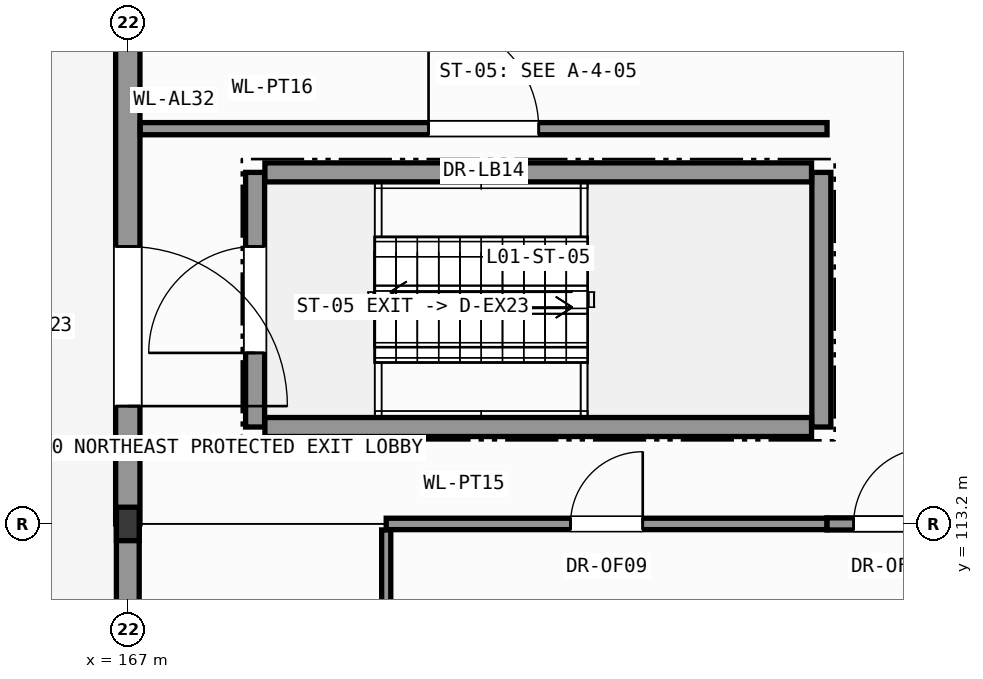
"""IFC4 building model, lengths in metres.
Left out: names, types, materials, properties, quantities, classifications, styles, units other than length and angle.
Written with IfcOpenShell. Run it as: python <this file> out.ifc"""

import sys

from ifc_helpers import new_model, si_unit, direction, frame, frame_2d, origin, origin_2d, place, context, subcontext, project, spatial, rectangle, i_section, extrude, element, fill, save


model = new_model("IFC4")
c1 = context("Model", 3, precision=1e-05, world=origin(), true_north=direction((0.0, 1.0)))
c2 = subcontext(c1, "Body", "Model", "MODEL_VIEW")
j1 = project(units=[si_unit("LENGTHUNIT", "METRE"), si_unit("PLANEANGLEUNIT", "RADIAN")], contexts=[c1])
p1 = place(None, origin())
s1 = spatial("IfcSite", under=j1, at=p1, CompositionType="ELEMENT")
p2 = place(p1, origin())
s2 = spatial("IfcBuilding", under=s1, at=p2, CompositionType="ELEMENT")
p3 = place(p2, origin())
s3 = spatial("IfcBuildingStorey", under=s2, at=p3, CompositionType="ELEMENT", Elevation=0.0)
p4 = place(p3, frame((167.0, 113.2, 0.0), z_axis=(0.0, 0.0, 1.0), x_axis=(1.0, 0.0, 0.0)))
e1 = element("IfcColumn", 1, at=p4, inside=s3, PredefinedType="COLUMN", context=c2, shape_type="SweptSolid", body=[
    extrude(i_section(OverallWidth=0.3, OverallDepth=0.44, WebThickness=0.011, FlangeThickness=0.021, FilletRadius=0.027, at=origin_2d()), origin(), (0.0, 0.0, 1.0), 7.8),
])
p5 = place(p3, frame((167.0, 113.2, 0.0), z_axis=(0.0, 0.0, 1.0), x_axis=(0.0, 1.0, 0.0)))
e2 = element("IfcWall", 2, at=p5, inside=s3, PredefinedType="SOLIDWALL", context=c2, shape_type="SweptSolid", body=[
    extrude(rectangle(XDim=7.6, YDim=0.32, at=frame_2d((3.8, 0.0))), origin(), (0.0, 0.0, 1.0), 7.235),
])
p6 = place(p5, frame((1.55, 0.0, 0.0)))
e3 = element("IfcOpeningElement", 3, at=p6, cuts=e2, PredefinedType="OPENING", context=c2, shape_type="SweptSolid", body=[
    extrude(rectangle(XDim=2.1, YDim=2.65, at=frame_2d((1.05, 1.325))), frame((0.0, 0.17, 0.0), z_axis=(0.0, -1.0, 0.0), x_axis=(1.0, 0.0, 0.0)), (0.0, 0.0, 1.0), 0.34),
])
p7 = place(p3, frame((167.0, 105.6, 0.0), z_axis=(0.0, 0.0, 1.0), x_axis=(0.0, 1.0, 0.0)))
e4 = element("IfcWall", 4, at=p7, inside=s3, PredefinedType="SOLIDWALL", context=c2, shape_type="SweptSolid", body=[
    extrude(rectangle(XDim=7.6, YDim=0.3, at=frame_2d((3.8, 0.0))), origin(), (0.0, 0.0, 1.0), 7.235),
])
p8 = place(p7, frame((1.783, 0.0, 0.95)))
e5 = element("IfcOpeningElement", 5, at=p8, cuts=e4, PredefinedType="OPENING", context=c2, shape_type="SweptSolid", body=[
    extrude(rectangle(XDim=1.5, YDim=2.4, at=frame_2d((0.75, 1.2))), frame((0.0, 0.16, 0.0), z_axis=(0.0, -1.0, 0.0), x_axis=(1.0, 0.0, 0.0)), (0.0, 0.0, 1.0), 0.32),
])
p9 = place(p7, frame((4.317, 0.0, 0.95)))
e6 = element("IfcOpeningElement", 6, at=p9, cuts=e4, PredefinedType="OPENING", context=c2, shape_type="SweptSolid", body=[
    extrude(rectangle(XDim=1.5, YDim=2.4, at=frame_2d((0.75, 1.2))), frame((0.0, 0.16, 0.0), z_axis=(0.0, -1.0, 0.0), x_axis=(1.0, 0.0, 0.0)), (0.0, 0.0, 1.0), 0.32),
])
p10 = place(p3, frame((168.675, 114.475, 0.0), z_axis=(0.0, 0.0, 1.0), x_axis=(0.0, 1.0, 0.0)))
e7 = element("IfcWall", 7, at=p10, inside=s3, PredefinedType="SHEAR", context=c2, shape_type="SweptSolid", body=[
    extrude(rectangle(XDim=3.35, YDim=0.25, at=frame_2d((1.675, 0.0))), origin(), (0.0, 0.0, 1.0), 7.54),
])
p11 = place(p10, frame((0.975, 0.0, 0.0)))
e8 = element("IfcOpeningElement", 8, at=p11, cuts=e7, PredefinedType="OPENING", context=c2, shape_type="SweptSolid", body=[
    extrude(rectangle(XDim=1.4, YDim=2.2, at=frame_2d((0.7, 1.1))), frame((0.0, 0.135, 0.0), z_axis=(0.0, -1.0, 0.0), x_axis=(1.0, 0.0, 0.0)), (0.0, 0.0, 1.0), 0.27),
])
p12 = place(p3, frame((176.125, 114.475, 0.0), z_axis=(0.0, 0.0, 1.0), x_axis=(0.0, 1.0, 0.0)))
e9 = element("IfcWall", 9, at=p12, inside=s3, PredefinedType="SHEAR", context=c2, shape_type="SweptSolid", body=[
    extrude(rectangle(XDim=3.35, YDim=0.25, at=frame_2d((1.675, 0.0))), origin(), (0.0, 0.0, 1.0), 7.54),
])
for number, where, z_axis, x_axis in (
    (10, (168.804, 114.475, 0.0), (0.0, 0.0, 1.0), (1.0, 0.0, 0.0)),
    (11, (168.804, 117.825, 0.0), (0.0, 0.0, 1.0), (1.0, 0.0, 0.0)),
):
    element("IfcWall", number, at=place(p3, frame(where, z_axis=z_axis, x_axis=x_axis)), inside=s3, PredefinedType="SHEAR", context=c2, shape_type="SweptSolid", body=[
        extrude(rectangle(XDim=7.192, YDim=0.25, at=frame_2d((3.596, 0.0))), origin(), (0.0, 0.0, 1.0), 7.54),
    ])
p13 = place(p3, frame((167.164, 118.4, 0.0), z_axis=(0.0, 0.0, 1.0), x_axis=(1.0, 0.0, 0.0)))
e12 = element("IfcWall", 12, at=p13, inside=s3, PredefinedType="PARTITIONING", context=c2, shape_type="SweptSolid", body=[
    extrude(rectangle(XDim=9.036, YDim=0.16, at=frame_2d((4.518, 0.0))), origin(), (0.0, 0.0, 1.0), 7.54),
])
p14 = place(p13, frame((3.793, 0.0, 0.0)))
e13 = element("IfcOpeningElement", 13, at=p14, cuts=e12, PredefinedType="OPENING", context=c2, shape_type="SweptSolid", body=[
    extrude(rectangle(XDim=1.45, YDim=2.35, at=frame_2d((0.725, 1.175))), frame((0.0, 0.09, 0.0), z_axis=(0.0, -1.0, 0.0), x_axis=(1.0, 0.0, 0.0)), (0.0, 0.0, 1.0), 0.18),
])
p15 = place(p3, frame((170.4, 113.2, 0.0), z_axis=(0.0, 0.0, 1.0), x_axis=(1.0, 0.0, 0.0)))
e14 = element("IfcWall", 14, at=p15, inside=s3, PredefinedType="PARTITIONING", context=c2, shape_type="SweptSolid", body=[
    extrude(rectangle(XDim=5.8, YDim=0.15, at=frame_2d((2.9, 0.0))), origin(), (0.0, 0.0, 1.0), 6.925),
])
p16 = place(p15, frame((2.425, 0.0, 0.0)))
e15 = element("IfcOpeningElement", 15, at=p16, cuts=e14, PredefinedType="OPENING", context=c2, shape_type="SweptSolid", body=[
    extrude(rectangle(XDim=0.95, YDim=2.1, at=frame_2d((0.475, 1.05))), frame((0.0, 0.085, 0.0), z_axis=(0.0, -1.0, 0.0), x_axis=(1.0, 0.0, 0.0)), (0.0, 0.0, 1.0), 0.17),
])
p17 = place(p3, frame((176.2, 113.2, 0.0), z_axis=(0.0, 0.0, 1.0), x_axis=(1.0, 0.0, 0.0)))
e16 = element("IfcWall", 16, at=p17, inside=s3, PredefinedType="PARTITIONING", context=c2, shape_type="SweptSolid", body=[
    extrude(rectangle(XDim=4.336, YDim=0.16, at=frame_2d((2.168, 0.0))), origin(), (0.0, 0.0, 1.0), 6.925),
])
p18 = place(p17, frame((0.35, 0.0, 0.0)))
e17 = element("IfcOpeningElement", 17, at=p18, cuts=e16, PredefinedType="OPENING", context=c2, shape_type="SweptSolid", body=[
    extrude(rectangle(XDim=1.0, YDim=2.15, at=frame_2d((0.5, 1.075))), frame((0.0, 0.09, 0.0), z_axis=(0.0, -1.0, 0.0), x_axis=(1.0, 0.0, 0.0)), (0.0, 0.0, 1.0), 0.18),
])
p19 = place(p3, frame((170.4, 85.279, 0.0), z_axis=(0.0, 0.0, 1.0), x_axis=(0.0, 1.0, 0.0)))
e18 = element("IfcWall", 18, at=p19, inside=s3, PredefinedType="PARTITIONING", context=c2, shape_type="SweptSolid", body=[
    extrude(rectangle(XDim=27.842, YDim=0.12, at=frame_2d((13.921, 0.0))), origin(), (0.0, 0.0, 1.0), 7.54),
])
p20 = place(p19, frame((13.396, 0.0, 0.0)))
e19 = element("IfcOpeningElement", 19, at=p20, cuts=e18, PredefinedType="OPENING", context=c2, shape_type="SweptSolid", body=[
    extrude(rectangle(XDim=1.05, YDim=2.2, at=frame_2d((0.525, 1.1))), frame((0.0, 0.07, 0.0), z_axis=(0.0, -1.0, 0.0), x_axis=(1.0, 0.0, 0.0)), (0.0, 0.0, 1.0), 0.14),
])
p21 = place(p6, origin())
e20 = element("IfcDoor", 20, at=p21, inside=s3, OperationType="SINGLE_SWING_LEFT", PredefinedType="DOOR", context=c2, shape_type="SweptSolid", body=[
    extrude(rectangle(XDim=2.1, YDim=2.65, at=frame_2d((1.05, 1.325))), frame((0.0, 0.025, 0.0), z_axis=(0.0, -1.0, 0.0), x_axis=(1.0, 0.0, 0.0)), (0.0, 0.0, 1.0), 0.05),
])
fill(e3, e20)
p22 = place(p11, origin())
e21 = element("IfcDoor", 21, at=p22, inside=s3, OperationType="SINGLE_SWING_LEFT", PredefinedType="DOOR", context=c2, shape_type="SweptSolid", body=[
    extrude(rectangle(XDim=1.4, YDim=2.2, at=frame_2d((0.7, 1.1))), frame((0.0, 0.025, 0.0), z_axis=(0.0, -1.0, 0.0), x_axis=(1.0, 0.0, 0.0)), (0.0, 0.0, 1.0), 0.05),
])
fill(e8, e21)
p23 = place(p14, origin())
e22 = element("IfcDoor", 22, at=p23, inside=s3, OperationType="SINGLE_SWING_LEFT", PredefinedType="DOOR", context=c2, shape_type="SweptSolid", body=[
    extrude(rectangle(XDim=1.45, YDim=2.35, at=frame_2d((0.725, 1.175))), frame((0.0, 0.025, 0.0), z_axis=(0.0, -1.0, 0.0), x_axis=(1.0, 0.0, 0.0)), (0.0, 0.0, 1.0), 0.05),
])
fill(e13, e22)
p24 = place(p16, origin())
e23 = element("IfcDoor", 23, at=p24, inside=s3, OperationType="SINGLE_SWING_RIGHT", PredefinedType="DOOR", context=c2, shape_type="SweptSolid", body=[
    extrude(rectangle(XDim=0.95, YDim=2.1, at=frame_2d((0.475, 1.05))), frame((0.0, 0.025, 0.0), z_axis=(0.0, -1.0, 0.0), x_axis=(1.0, 0.0, 0.0)), (0.0, 0.0, 1.0), 0.05),
])
fill(e15, e23)
p25 = place(p18, origin())
e24 = element("IfcDoor", 24, at=p25, inside=s3, OperationType="SINGLE_SWING_RIGHT", PredefinedType="DOOR", context=c2, shape_type="SweptSolid", body=[
    extrude(rectangle(XDim=1.0, YDim=2.15, at=frame_2d((0.5, 1.075))), frame((0.0, 0.025, 0.0), z_axis=(0.0, -1.0, 0.0), x_axis=(1.0, 0.0, 0.0)), (0.0, 0.0, 1.0), 0.05),
])
fill(e17, e24)
save(model, sys.argv[1])
